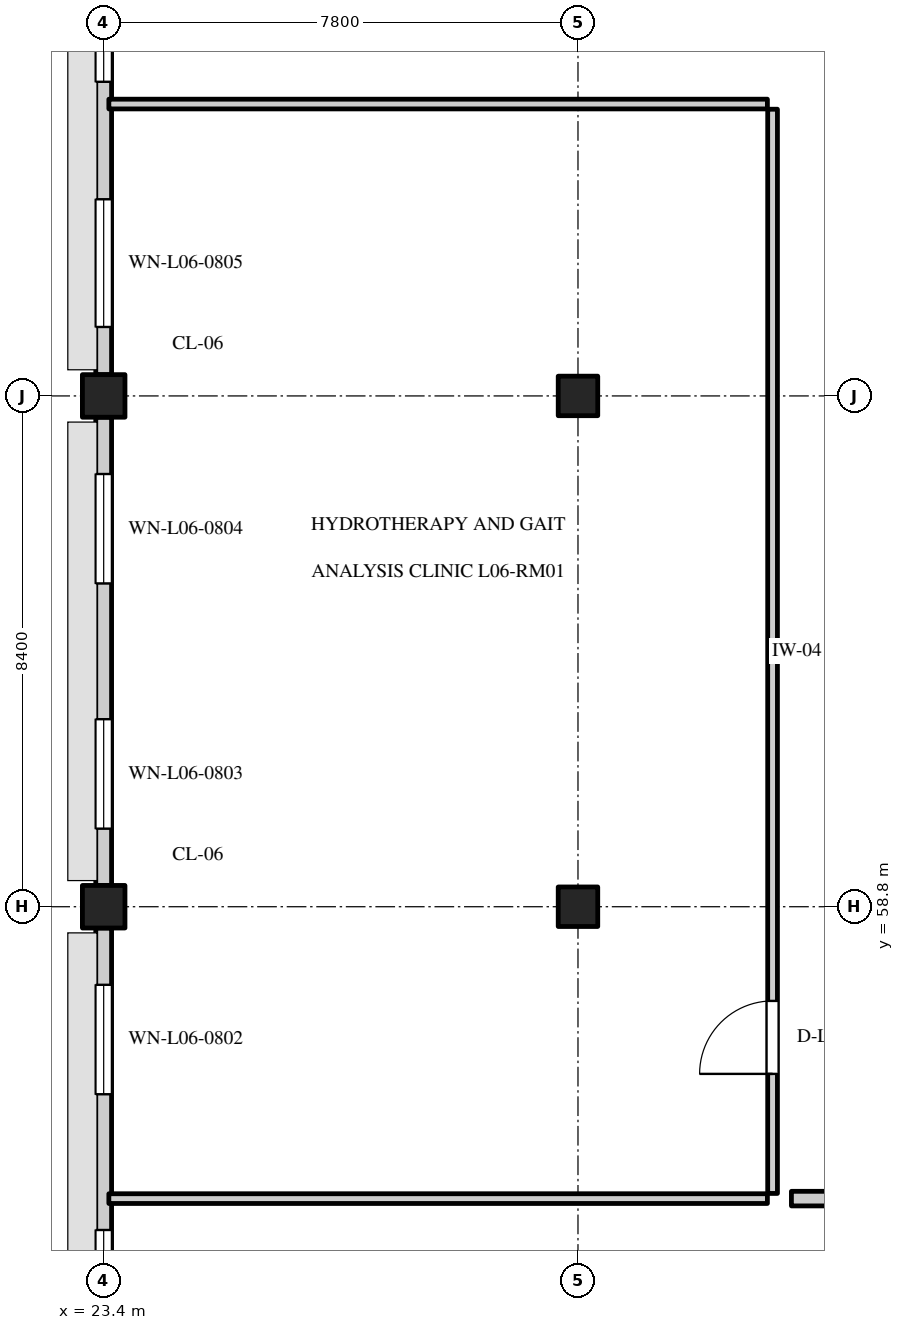
"""IFC4 building model, lengths in metres.
Left out: names, types, materials, properties, quantities, classifications, styles, units other than length and angle.
Written with IfcOpenShell. Run it as: python <this file> out.ifc"""

import sys

from ifc_helpers import new_model, si_unit, direction, frame, frame_2d, origin, origin_2d, place, context, subcontext, project, spatial, rectangle, extrude, element, fill, save


model = new_model("IFC4")
c1 = context("Model", 3, precision=1e-05, world=origin(), true_north=direction((0.0, 1.0)))
c2 = subcontext(c1, "Body", "Model", "MODEL_VIEW")
j1 = project(units=[si_unit("LENGTHUNIT", "METRE"), si_unit("PLANEANGLEUNIT", "RADIAN")], contexts=[c1])
p1 = place(None, origin())
s1 = spatial("IfcSite", under=j1, at=p1, CompositionType="ELEMENT")
p2 = place(p1, origin())
s2 = spatial("IfcBuilding", under=s1, at=p2, CompositionType="ELEMENT")
p3 = place(p2, frame((0.0, 0.0, 26.1)))
s3 = spatial("IfcBuildingStorey", under=s2, at=p3, CompositionType="ELEMENT", Elevation=26.1)
for number, where, z_axis, x_axis in (
    (1, (23.4, 58.8, 0.0), (0.0, 0.0, 1.0), (1.0, 0.0, 0.0)),
    (2, (23.4, 67.2, 0.0), (0.0, 0.0, 1.0), (1.0, 0.0, 0.0)),
):
    element("IfcColumn", number, at=place(p3, frame(where, z_axis=z_axis, x_axis=x_axis)), inside=s3, PredefinedType="COLUMN", context=c2, shape_type="SweptSolid", body=[
        extrude(rectangle(XDim=0.7, YDim=0.7, at=origin_2d()), origin(), (0.0, 0.0, 1.0), 3.6),
    ])
for number, where, z_axis, x_axis in (
    (3, (31.2, 58.8, 0.0), (0.0, 0.0, 1.0), (1.0, 0.0, 0.0)),
    (4, (31.2, 67.2, 0.0), (0.0, 0.0, 1.0), (1.0, 0.0, 0.0)),
):
    element("IfcColumn", number, at=place(p3, frame(where, z_axis=z_axis, x_axis=x_axis)), inside=s3, PredefinedType="COLUMN", context=c2, shape_type="SweptSolid", body=[
        extrude(rectangle(XDim=0.65, YDim=0.65, at=origin_2d()), origin(), (0.0, 0.0, 1.0), 3.6),
    ])
p4 = place(p3, frame((23.4, 50.75, 0.0), z_axis=(0.0, 0.0, 1.0), x_axis=(0.0, 1.0, 0.0)))
e5 = element("IfcWall", 5, at=p4, inside=s3, PredefinedType="STANDARD", context=c2, shape_type="SweptSolid", body=[
    extrude(rectangle(XDim=7.7, YDim=0.26, at=frame_2d((3.85, 0.0))), origin(), (0.0, 0.0, 1.0), 2.65),
])
p5 = place(p4, frame((0.934, 0.0, 0.8)))
e6 = element("IfcOpeningElement", 6, at=p5, cuts=e5, PredefinedType="OPENING", context=c2, shape_type="SweptSolid", body=[
    extrude(rectangle(XDim=1.8, YDim=1.55, at=frame_2d((0.9, 0.775))), frame((0.0, 0.142, 0.0), z_axis=(0.0, -1.0, 0.0), x_axis=(1.0, 0.0, 0.0)), (0.0, 0.0, 1.0), 0.284),
])
p6 = place(p4, frame((4.966, 0.0, 0.8)))
e7 = element("IfcOpeningElement", 7, at=p6, cuts=e5, PredefinedType="OPENING", context=c2, shape_type="SweptSolid", body=[
    extrude(rectangle(XDim=1.8, YDim=1.55, at=frame_2d((0.9, 0.775))), frame((0.0, 0.142, 0.0), z_axis=(0.0, -1.0, 0.0), x_axis=(1.0, 0.0, 0.0)), (0.0, 0.0, 1.0), 0.284),
])
p7 = place(p3, frame((23.4, 59.15, 0.0), z_axis=(0.0, 0.0, 1.0), x_axis=(0.0, 1.0, 0.0)))
e8 = element("IfcWall", 8, at=p7, inside=s3, PredefinedType="STANDARD", context=c2, shape_type="SweptSolid", body=[
    extrude(rectangle(XDim=7.7, YDim=0.26, at=frame_2d((3.85, 0.0))), origin(), (0.0, 0.0, 1.0), 2.65),
])
p8 = place(p7, frame((0.934, 0.0, 0.8)))
e9 = element("IfcOpeningElement", 9, at=p8, cuts=e8, PredefinedType="OPENING", context=c2, shape_type="SweptSolid", body=[
    extrude(rectangle(XDim=1.8, YDim=1.45, at=frame_2d((0.9, 0.725))), frame((0.0, 0.142, 0.0), z_axis=(0.0, -1.0, 0.0), x_axis=(1.0, 0.0, 0.0)), (0.0, 0.0, 1.0), 0.284),
])
p9 = place(p7, frame((4.966, 0.0, 0.8)))
e10 = element("IfcOpeningElement", 10, at=p9, cuts=e8, PredefinedType="OPENING", context=c2, shape_type="SweptSolid", body=[
    extrude(rectangle(XDim=1.8, YDim=1.45, at=frame_2d((0.9, 0.725))), frame((0.0, 0.142, 0.0), z_axis=(0.0, -1.0, 0.0), x_axis=(1.0, 0.0, 0.0)), (0.0, 0.0, 1.0), 0.284),
])
p10 = place(p3, frame((23.4, 67.55, 0.0), z_axis=(0.0, 0.0, 1.0), x_axis=(0.0, 1.0, 0.0)))
e11 = element("IfcWall", 11, at=p10, inside=s3, PredefinedType="STANDARD", context=c2, shape_type="SweptSolid", body=[
    extrude(rectangle(XDim=7.7, YDim=0.26, at=frame_2d((3.85, 0.0))), origin(), (0.0, 0.0, 1.0), 2.65),
])
p11 = place(p10, frame((0.784, 0.0, 0.8)))
e12 = element("IfcOpeningElement", 12, at=p11, cuts=e11, PredefinedType="OPENING", context=c2, shape_type="SweptSolid", body=[
    extrude(rectangle(XDim=2.1, YDim=1.55, at=frame_2d((1.05, 0.775))), frame((0.0, 0.142, 0.0), z_axis=(0.0, -1.0, 0.0), x_axis=(1.0, 0.0, 0.0)), (0.0, 0.0, 1.0), 0.284),
])
p12 = place(p10, frame((4.816, 0.0, 0.8)))
e13 = element("IfcOpeningElement", 13, at=p12, cuts=e11, PredefinedType="OPENING", context=c2, shape_type="SweptSolid", body=[
    extrude(rectangle(XDim=2.1, YDim=1.55, at=frame_2d((1.05, 0.775))), frame((0.0, 0.142, 0.0), z_axis=(0.0, -1.0, 0.0), x_axis=(1.0, 0.0, 0.0)), (0.0, 0.0, 1.0), 0.284),
])
p13 = place(p3, frame((34.4, 54.085, 0.0), z_axis=(0.0, 0.0, 1.0), x_axis=(0.0, 1.0, 0.0)))
e14 = element("IfcWall", 14, at=p13, inside=s3, PredefinedType="PARTITIONING", context=c2, shape_type="SweptSolid", body=[
    extrude(rectangle(XDim=17.83, YDim=0.16, at=frame_2d((8.915, 0.0))), origin(), (0.0, 0.0, 1.0), 3.28),
])
p14 = place(p13, frame((1.966, 0.0, 0.0)))
e15 = element("IfcOpeningElement", 15, at=p14, cuts=e14, PredefinedType="OPENING", context=c2, shape_type="SweptSolid", body=[
    extrude(rectangle(XDim=1.2, YDim=2.15, at=frame_2d((0.6, 1.075))), frame((0.0, 0.092, 0.0), z_axis=(0.0, -1.0, 0.0), x_axis=(1.0, 0.0, 0.0)), (0.0, 0.0, 1.0), 0.184),
])
for number, where, z_axis, x_axis in (
    (16, (23.485, 54.0, 0.0), (0.0, 0.0, 1.0), (1.0, 0.0, 0.0)),
    (17, (23.485, 72.0, 0.0), (0.0, 0.0, 1.0), (1.0, 0.0, 0.0)),
):
    element("IfcWall", number, at=place(p3, frame(where, z_axis=z_axis, x_axis=x_axis)), inside=s3, PredefinedType="PARTITIONING", context=c2, shape_type="SweptSolid", body=[
        extrude(rectangle(XDim=10.83, YDim=0.16, at=frame_2d((5.415, 0.0))), origin(), (0.0, 0.0, 1.0), 3.28),
    ])
for number, where, z_axis, x_axis in (
    (18, (23.4, 58.49, 0.0), (0.0, 0.0, 1.0), (0.0, 1.0, 0.0)),
    (19, (23.4, 66.89, 0.0), (0.0, 0.0, 1.0), (0.0, 1.0, 0.0)),
):
    element("IfcWall", number, at=place(p3, frame(where, z_axis=z_axis, x_axis=x_axis)), inside=s3, PredefinedType="PARTITIONING", context=c2, shape_type="SweptSolid", body=[
        extrude(rectangle(XDim=0.62, YDim=0.16, at=frame_2d((0.31, 0.0))), origin(), (0.0, 0.0, 1.0), 2.65),
    ])
p15 = place(p3, frame((34.71, 54.0, 0.0), z_axis=(0.0, 0.0, 1.0), x_axis=(1.0, 0.0, 0.0)))
e20 = element("IfcWall", 20, at=p15, inside=s3, PredefinedType="STANDARD", context=c2, shape_type="SweptSolid", body=[
    extrude(rectangle(XDim=9.78, YDim=0.24, at=frame_2d((4.89, 0.0))), origin(), (0.0, 0.0, 1.0), 3.28),
])
p16 = place(p15, frame((1.965, 0.0, 0.0)))
e21 = element("IfcOpeningElement", 21, at=p16, cuts=e20, PredefinedType="OPENING", context=c2, shape_type="SweptSolid", body=[
    extrude(rectangle(XDim=1.08, YDim=2.15, at=frame_2d((0.54, 1.075))), frame((0.0, 0.132, 0.0), z_axis=(0.0, -1.0, 0.0), x_axis=(1.0, 0.0, 0.0)), (0.0, 0.0, 1.0), 0.264),
])
p17 = place(p3, frame((34.71, 63.0, 0.0), z_axis=(0.0, 0.0, 1.0), x_axis=(1.0, 0.0, 0.0)))
e22 = element("IfcWall", 22, at=p17, inside=s3, PredefinedType="STANDARD", context=c2, shape_type="SweptSolid", body=[
    extrude(rectangle(XDim=9.78, YDim=0.24, at=frame_2d((4.89, 0.0))), origin(), (0.0, 0.0, 1.0), 3.28),
])
p18 = place(p5, origin())
e23 = element("IfcWindow", 23, at=p18, inside=s3, PartitioningType="DOUBLE_PANEL_VERTICAL", PredefinedType="WINDOW", context=c2, shape_type="SweptSolid", body=[
    extrude(rectangle(XDim=1.8, YDim=1.55, at=frame_2d((0.9, 0.775))), frame((0.0, 0.03, 0.0), z_axis=(0.0, -1.0, 0.0), x_axis=(1.0, 0.0, 0.0)), (0.0, 0.0, 1.0), 0.06),
])
fill(e6, e23)
p19 = place(p6, origin())
e24 = element("IfcWindow", 24, at=p19, inside=s3, PartitioningType="DOUBLE_PANEL_VERTICAL", PredefinedType="WINDOW", context=c2, shape_type="SweptSolid", body=[
    extrude(rectangle(XDim=1.8, YDim=1.55, at=frame_2d((0.9, 0.775))), frame((0.0, 0.03, 0.0), z_axis=(0.0, -1.0, 0.0), x_axis=(1.0, 0.0, 0.0)), (0.0, 0.0, 1.0), 0.06),
])
fill(e7, e24)
p20 = place(p8, origin())
e25 = element("IfcWindow", 25, at=p20, inside=s3, PartitioningType="DOUBLE_PANEL_VERTICAL", PredefinedType="WINDOW", context=c2, shape_type="SweptSolid", body=[
    extrude(rectangle(XDim=1.8, YDim=1.45, at=frame_2d((0.9, 0.725))), frame((0.0, 0.03, 0.0), z_axis=(0.0, -1.0, 0.0), x_axis=(1.0, 0.0, 0.0)), (0.0, 0.0, 1.0), 0.06),
])
fill(e9, e25)
p21 = place(p9, origin())
e26 = element("IfcWindow", 26, at=p21, inside=s3, PartitioningType="DOUBLE_PANEL_VERTICAL", PredefinedType="WINDOW", context=c2, shape_type="SweptSolid", body=[
    extrude(rectangle(XDim=1.8, YDim=1.45, at=frame_2d((0.9, 0.725))), frame((0.0, 0.03, 0.0), z_axis=(0.0, -1.0, 0.0), x_axis=(1.0, 0.0, 0.0)), (0.0, 0.0, 1.0), 0.06),
])
fill(e10, e26)
p22 = place(p11, origin())
e27 = element("IfcWindow", 27, at=p22, inside=s3, PartitioningType="DOUBLE_PANEL_VERTICAL", PredefinedType="WINDOW", context=c2, shape_type="SweptSolid", body=[
    extrude(rectangle(XDim=2.1, YDim=1.55, at=frame_2d((1.05, 0.775))), frame((0.0, 0.03, 0.0), z_axis=(0.0, -1.0, 0.0), x_axis=(1.0, 0.0, 0.0)), (0.0, 0.0, 1.0), 0.06),
])
fill(e12, e27)
p23 = place(p12, origin())
e28 = element("IfcWindow", 28, at=p23, inside=s3, PartitioningType="DOUBLE_PANEL_VERTICAL", PredefinedType="WINDOW", context=c2, shape_type="SweptSolid", body=[
    extrude(rectangle(XDim=2.1, YDim=1.55, at=frame_2d((1.05, 0.775))), frame((0.0, 0.03, 0.0), z_axis=(0.0, -1.0, 0.0), x_axis=(1.0, 0.0, 0.0)), (0.0, 0.0, 1.0), 0.06),
])
fill(e13, e28)
p24 = place(p14, origin())
e29 = element("IfcDoor", 29, at=p24, inside=s3, OperationType="SINGLE_SWING_LEFT", PredefinedType="DOOR", context=c2, shape_type="SweptSolid", body=[
    extrude(rectangle(XDim=1.2, YDim=2.15, at=frame_2d((0.6, 1.075))), frame((0.0, 0.025, 0.0), z_axis=(0.0, -1.0, 0.0), x_axis=(1.0, 0.0, 0.0)), (0.0, 0.0, 1.0), 0.05),
])
fill(e15, e29)
save(model, sys.argv[1])
